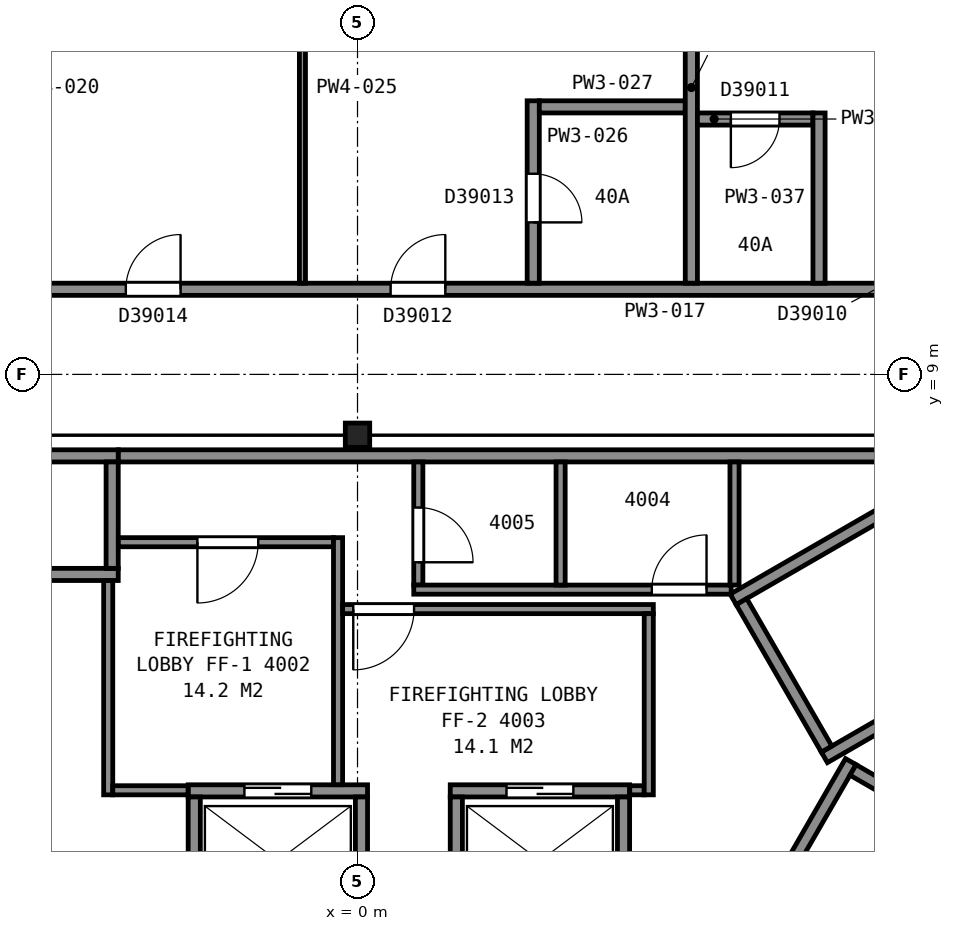
"""IFC4 building model, lengths in metres.
Left out: names, types, materials, properties, quantities, classifications, styles, units other than length and angle.
Written with IfcOpenShell. Run it as: python <this file> out.ifc"""

import sys

from ifc_helpers import new_model, si_unit, direction, frame, frame_2d, origin, origin_2d, place, context, subcontext, project, spatial, rectangle, i_section, extrude, element, fill, save


model = new_model("IFC4")
c1 = context("Model", 3, precision=1e-05, world=origin(), true_north=direction((0.0, 1.0)))
c2 = subcontext(c1, "Body", "Model", "MODEL_VIEW")
j1 = project(units=[si_unit("LENGTHUNIT", "METRE"), si_unit("PLANEANGLEUNIT", "RADIAN")], contexts=[c1])
p1 = place(None, origin())
s1 = spatial("IfcSite", under=j1, at=p1, CompositionType="ELEMENT")
p2 = place(p1, origin())
s2 = spatial("IfcBuilding", under=s1, at=p2, CompositionType="ELEMENT")
p3 = place(p2, frame((0.0, 0.0, 163.6)))
s3 = spatial("IfcBuildingStorey", under=s2, at=p3, CompositionType="ELEMENT", Elevation=163.6)
p4 = place(p3, frame((0.0, 8.0, 0.0), z_axis=(0.0, 0.0, 1.0), x_axis=(1.0, 0.0, 0.0)))
e1 = element("IfcColumn", 1, at=p4, inside=s3, PredefinedType="COLUMN", context=c2, shape_type="SweptSolid", body=[
    extrude(i_section(OverallWidth=0.401, OverallDepth=0.399, WebThickness=0.025, FlangeThickness=0.04, FilletRadius=0.015, at=origin_2d()), origin(), (0.0, 0.0, 1.0), 3.7),
])
for number, where, z_axis, x_axis in (
    (2, (6.178, 5.299, 0.0), (0.0, 0.0, 1.0), (0.866, 0.5, 0.0)),
    (3, (7.678, 2.701, 0.0), (0.0, 0.0, 1.0), (0.866, 0.5, 0.0)),
):
    element("IfcWall", number, at=place(p3, frame(where, z_axis=z_axis, x_axis=x_axis)), inside=s3, PredefinedType="PARTITIONING", context=c2, shape_type="SweptSolid", body=[
        extrude(rectangle(XDim=9.6, YDim=0.2, at=frame_2d((4.8, 0.0))), origin(), (0.0, 0.0, 1.0), 3.45),
    ])
p5 = place(p3, frame((7.715, 2.838, 0.0), z_axis=(0.0, 0.0, 1.0), x_axis=(-0.500049511043, 0.865996816683, 0.0)))
e4 = element("IfcWall", 4, at=p5, inside=s3, PredefinedType="PARTITIONING", context=c2, shape_type="SweptSolid", body=[
    extrude(rectangle(XDim=2.8, YDim=0.2, at=frame_2d((1.4, 0.0))), origin(), (0.0, 0.0, 1.0), 3.45),
])
p6 = place(p3, frame((-2.785, 2.15, 0.0), z_axis=(0.0, 0.0, 1.0), x_axis=(1.0, 0.0, 0.0)))
e5 = element("IfcWall", 5, at=p6, inside=s3, PredefinedType="PARTITIONING", context=c2, shape_type="SweptSolid", body=[
    extrude(rectangle(XDim=2.95, YDim=0.2, at=frame_2d((1.475, 0.0))), origin(), (0.0, 0.0, 1.0), 3.7),
])
p7 = place(p6, frame((0.925, 0.0, 0.0)))
e6 = element("IfcOpeningElement", 6, at=p7, cuts=e5, PredefinedType="OPENING", context=c2, shape_type="SweptSolid", body=[
    extrude(rectangle(XDim=1.1, YDim=2.1, at=frame_2d((0.55, 1.05))), frame((0.0, 0.11, 0.0), z_axis=(0.0, -1.0, 0.0), x_axis=(1.0, 0.0, 0.0)), (0.0, 0.0, 1.0), 0.22),
])
p8 = place(p3, frame((1.525, 2.15, 0.0), z_axis=(0.0, 0.0, 1.0), x_axis=(1.0, 0.0, 0.0)))
e7 = element("IfcWall", 7, at=p8, inside=s3, PredefinedType="PARTITIONING", context=c2, shape_type="SweptSolid", body=[
    extrude(rectangle(XDim=2.95, YDim=0.2, at=frame_2d((1.475, 0.0))), origin(), (0.0, 0.0, 1.0), 3.7),
])
p9 = place(p8, frame((0.925, 0.0, 0.0)))
e8 = element("IfcOpeningElement", 8, at=p9, cuts=e7, PredefinedType="OPENING", context=c2, shape_type="SweptSolid", body=[
    extrude(rectangle(XDim=1.1, YDim=2.1, at=frame_2d((0.55, 1.05))), frame((0.0, 0.11, 0.0), z_axis=(0.0, -1.0, 0.0), x_axis=(1.0, 0.0, 0.0)), (0.0, 0.0, 1.0), 0.22),
])
for number, where, z_axis, x_axis in (
    (9, (-6.285, 5.71, 0.0), (0.0, 0.0, 1.0), (1.0, 0.0, 0.0)),
    (10, (-6.285, 7.66, 0.0), (0.0, 0.0, 1.0), (1.0, 0.0, 0.0)),
):
    element("IfcWall", number, at=place(p3, frame(where, z_axis=z_axis, x_axis=x_axis)), inside=s3, PredefinedType="PARTITIONING", context=c2, shape_type="SweptSolid", body=[
        extrude(rectangle(XDim=2.35, YDim=0.2, at=frame_2d((1.175, 0.0))), origin(), (0.0, 0.0, 1.0), 3.7),
    ])
p10 = place(p3, frame((7.351, -2.587, 0.0), z_axis=(0.0, 0.0, 1.0), x_axis=(0.500002801628, 0.866023786258, 0.0)))
e11 = element("IfcWall", 11, at=p10, inside=s3, PredefinedType="PARTITIONING", context=c2, shape_type="SweptSolid", body=[
    extrude(rectangle(XDim=4.9, YDim=0.2, at=frame_2d((2.45, 0.0))), origin(), (0.0, 0.0, 1.0), 3.7),
])
p11 = place(p3, frame((5.663, -1.612, 0.0), z_axis=(0.0, 0.0, 1.0), x_axis=(0.49998122708, 0.866036242063, 0.0)))
e12 = element("IfcWall", 12, at=p11, inside=s3, PredefinedType="PARTITIONING", context=c2, shape_type="SweptSolid", body=[
    extrude(rectangle(XDim=4.9, YDim=0.2, at=frame_2d((2.45, 0.0))), origin(), (0.0, 0.0, 1.0), 3.7),
])
for number, where, z_axis, x_axis in (
    (13, (4.375, 0.1, 0.0), (0.0, 0.0, 1.0), (0.0, 1.0, 0.0)),
    (14, (1.625, 0.1, 0.0), (0.0, 0.0, 1.0), (0.0, 1.0, 0.0)),
    (15, (0.065, 0.1, 0.0), (0.0, 0.0, 1.0), (0.0, 1.0, 0.0)),
    (16, (-2.685, 0.1, 0.0), (0.0, 0.0, 1.0), (0.0, 1.0, 0.0)),
):
    element("IfcWall", number, at=place(p3, frame(where, z_axis=z_axis, x_axis=x_axis)), inside=s3, PredefinedType="PARTITIONING", context=c2, shape_type="SweptSolid", body=[
        extrude(rectangle(XDim=1.95, YDim=0.2, at=frame_2d((0.975, 0.0))), origin(), (0.0, 0.0, 1.0), 3.7),
    ])
p12 = place(p3, frame((-4.035, 5.81, 0.0), z_axis=(0.0, 0.0, 1.0), x_axis=(0.0, 1.0, 0.0)))
e17 = element("IfcWall", 17, at=p12, inside=s3, PredefinedType="PARTITIONING", context=c2, shape_type="SweptSolid", body=[
    extrude(rectangle(XDim=1.75, YDim=0.2, at=frame_2d((0.875, 0.0))), origin(), (0.0, 0.0, 1.0), 3.7),
])
p13 = place(p3, frame((9.665, 1.62, 0.0), z_axis=(0.0, 0.0, 1.0), x_axis=(-0.866002029911, 0.500040482552, 0.0)))
e18 = element("IfcWall", 18, at=p13, inside=s3, PredefinedType="PARTITIONING", context=c2, shape_type="SweptSolid", body=[
    extrude(rectangle(XDim=1.75, YDim=0.2, at=frame_2d((0.875, 0.0))), origin(), (0.0, 0.0, 1.0), 3.7),
])
p14 = place(p3, frame((-4.1, 2.085, 0.0), z_axis=(0.0, 0.0, 1.0), x_axis=(0.0, 1.0, 0.0)))
e19 = element("IfcWall", 19, at=p14, inside=s3, PredefinedType="PARTITIONING", context=c2, shape_type="SweptSolid", body=[
    extrude(rectangle(XDim=3.523, YDim=0.15, at=frame_2d((1.761, 0.0))), origin(), (0.0, 0.0, 1.0), 3.45),
])
p15 = place(p3, frame((-4.025, 2.16, 0.0), z_axis=(0.0, 0.0, 1.0), x_axis=(1.0, 0.0, 0.0)))
e20 = element("IfcWall", 20, at=p15, inside=s3, PredefinedType="PARTITIONING", context=c2, shape_type="SweptSolid", body=[
    extrude(rectangle(XDim=1.238, YDim=0.15, at=frame_2d((0.619, 0.0))), origin(), (0.0, 0.0, 1.0), 3.45),
])
p16 = place(p3, frame((-3.933, 6.24, 0.0), z_axis=(0.0, 0.0, 1.0), x_axis=(1.0, 0.0, 0.0)))
e21 = element("IfcWall", 21, at=p16, inside=s3, PredefinedType="PARTITIONING", context=c2, shape_type="SweptSolid", body=[
    extrude(rectangle(XDim=3.538, YDim=0.15, at=frame_2d((1.769, 0.0))), origin(), (0.0, 0.0, 1.0), 3.45),
])
p17 = place(p16, frame((1.3, 0.0, 0.0)))
e22 = element("IfcOpeningElement", 22, at=p17, cuts=e21, PredefinedType="OPENING", context=c2, shape_type="SweptSolid", body=[
    extrude(rectangle(XDim=1.0, YDim=2.1, at=frame_2d((0.5, 1.05))), frame((0.0, 0.085, 0.0), z_axis=(0.0, -1.0, 0.0), x_axis=(1.0, 0.0, 0.0)), (0.0, 0.0, 1.0), 0.17),
])
p18 = place(p3, frame((-3.933, 7.66, 0.0), z_axis=(0.0, 0.0, 1.0), x_axis=(1.0, 0.0, 0.0)))
e23 = element("IfcWall", 23, at=p18, inside=s3, PredefinedType="PARTITIONING", context=c2, shape_type="SweptSolid", body=[
    extrude(rectangle(XDim=13.841, YDim=0.2, at=frame_2d((6.92, 0.0))), origin(), (0.0, 0.0, 1.0), 3.45),
])
p19 = place(p3, frame((-0.32, 2.252, 0.0), z_axis=(0.0, 0.0, 1.0), x_axis=(0.0, 1.0, 0.0)))
e24 = element("IfcWall", 24, at=p19, inside=s3, PredefinedType="PARTITIONING", context=c2, shape_type="SweptSolid", body=[
    extrude(rectangle(XDim=4.063, YDim=0.15, at=frame_2d((2.031, 0.0))), origin(), (0.0, 0.0, 1.0), 3.45),
])
p20 = place(p3, frame((-0.245, 5.14, 0.0), z_axis=(0.0, 0.0, 1.0), x_axis=(1.0, 0.0, 0.0)))
e25 = element("IfcWall", 25, at=p20, inside=s3, PredefinedType="PARTITIONING", context=c2, shape_type="SweptSolid", body=[
    extrude(rectangle(XDim=5.11, YDim=0.15, at=frame_2d((2.555, 0.0))), origin(), (0.0, 0.0, 1.0), 3.45),
])
p21 = place(p20, frame((0.175, 0.0, 0.0)))
e26 = element("IfcOpeningElement", 26, at=p21, cuts=e25, PredefinedType="OPENING", context=c2, shape_type="SweptSolid", body=[
    extrude(rectangle(XDim=1.0, YDim=2.1, at=frame_2d((0.5, 1.05))), frame((0.0, 0.085, 0.0), z_axis=(0.0, -1.0, 0.0), x_axis=(1.0, 0.0, 0.0)), (0.0, 0.0, 1.0), 0.17),
])
p22 = place(p3, frame((1.0, 7.56, 0.0), z_axis=(0.0, 0.0, 1.0), x_axis=(0.0, -1.0, 0.0)))
e27 = element("IfcWall", 27, at=p22, inside=s3, PredefinedType="PARTITIONING", context=c2, shape_type="SweptSolid", body=[
    extrude(rectangle(XDim=2.025, YDim=0.15, at=frame_2d((1.013, 0.0))), origin(), (0.0, 0.0, 1.0), 3.45),
])
p23 = place(p22, frame((0.75, 0.0, 0.0)))
e28 = element("IfcOpeningElement", 28, at=p23, cuts=e27, PredefinedType="OPENING", context=c2, shape_type="SweptSolid", body=[
    extrude(rectangle(XDim=0.9, YDim=2.1, at=frame_2d((0.45, 1.05))), frame((0.0, 0.085, 0.0), z_axis=(0.0, -1.0, 0.0), x_axis=(1.0, 0.0, 0.0)), (0.0, 0.0, 1.0), 0.17),
])
p24 = place(p3, frame((0.925, 5.46, 0.0), z_axis=(0.0, 0.0, 1.0), x_axis=(1.0, 0.0, 0.0)))
e29 = element("IfcWall", 29, at=p24, inside=s3, PredefinedType="PARTITIONING", context=c2, shape_type="SweptSolid", body=[
    extrude(rectangle(XDim=5.22, YDim=0.15, at=frame_2d((2.61, 0.0))), origin(), (0.0, 0.0, 1.0), 3.45),
])
p25 = place(p24, frame((3.915, 0.0, 0.0)))
e30 = element("IfcOpeningElement", 30, at=p25, cuts=e29, PredefinedType="OPENING", context=c2, shape_type="SweptSolid", body=[
    extrude(rectangle(XDim=0.9, YDim=2.1, at=frame_2d((0.45, 1.05))), frame((0.0, 0.085, 0.0), z_axis=(0.0, -1.0, 0.0), x_axis=(1.0, 0.0, 0.0)), (0.0, 0.0, 1.0), 0.17),
])
p26 = place(p3, frame((3.34, 5.535, 0.0), z_axis=(0.0, 0.0, 1.0), x_axis=(0.0, 1.0, 0.0)))
e31 = element("IfcWall", 31, at=p26, inside=s3, PredefinedType="PARTITIONING", context=c2, shape_type="SweptSolid", body=[
    extrude(rectangle(XDim=2.025, YDim=0.15, at=frame_2d((1.013, 0.0))), origin(), (0.0, 0.0, 1.0), 3.45),
])
p27 = place(p3, frame((4.477, 2.16, 0.0), z_axis=(0.0, 0.0, 1.0), x_axis=(1.0, 0.0, 0.0)))
e32 = element("IfcWall", 32, at=p27, inside=s3, PredefinedType="PARTITIONING", context=c2, shape_type="SweptSolid", body=[
    extrude(rectangle(XDim=0.238, YDim=0.15, at=frame_2d((0.119, 0.0))), origin(), (0.0, 0.0, 1.0), 3.45),
])
p28 = place(p3, frame((4.79, 2.085, 0.0), z_axis=(0.0, 0.0, 1.0), x_axis=(0.0, 1.0, 0.0)))
e33 = element("IfcWall", 33, at=p28, inside=s3, PredefinedType="PARTITIONING", context=c2, shape_type="SweptSolid", body=[
    extrude(rectangle(XDim=2.98, YDim=0.15, at=frame_2d((1.49, 0.0))), origin(), (0.0, 0.0, 1.0), 3.45),
])
p29 = place(p3, frame((6.2, 5.535, 0.0), z_axis=(0.0, 0.0, 1.0), x_axis=(0.0, 1.0, 0.0)))
e34 = element("IfcWall", 34, at=p29, inside=s3, PredefinedType="PARTITIONING", context=c2, shape_type="SweptSolid", body=[
    extrude(rectangle(XDim=2.025, YDim=0.15, at=frame_2d((1.013, 0.0))), origin(), (0.0, 0.0, 1.0), 3.45),
])
p30 = place(p3, frame((-4.675, -12.706, 0.0), z_axis=(0.0, 0.0, 1.0), x_axis=(-0.499972470324, 0.866041297467, 0.0)))
e35 = element("IfcWall", 35, at=p30, inside=s3, PredefinedType="PARTITIONING", context=c2, shape_type="SweptSolid", body=[
    extrude(rectangle(XDim=17.385, YDim=0.2, at=frame_2d((8.692, 0.0))), origin(), (0.0, 0.0, 1.0), 2.713),
])
p31 = place(p30, frame((15.435, 0.0, 0.0)))
e36 = element("IfcOpeningElement", 36, at=p31, cuts=e35, PredefinedType="OPENING", context=c2, shape_type="SweptSolid", body=[
    extrude(rectangle(XDim=0.9, YDim=2.1, at=frame_2d((0.45, 1.05))), frame((0.0, 0.11, 0.0), z_axis=(0.0, -1.0, 0.0), x_axis=(1.0, 0.0, 0.0)), (0.0, 0.0, 1.0), 0.22),
])
p32 = place(p30, frame((12.835, 0.0, 0.0)))
e37 = element("IfcOpeningElement", 37, at=p32, cuts=e35, PredefinedType="OPENING", context=c2, shape_type="SweptSolid", body=[
    extrude(rectangle(XDim=0.9, YDim=2.1, at=frame_2d((0.45, 1.05))), frame((0.0, 0.11, 0.0), z_axis=(0.0, -1.0, 0.0), x_axis=(1.0, 0.0, 0.0)), (0.0, 0.0, 1.0), 0.22),
])
p33 = place(p30, frame((6.941, 0.0, 0.0)))
e38 = element("IfcOpeningElement", 38, at=p33, cuts=e35, PredefinedType="OPENING", context=c2, shape_type="SweptSolid", body=[
    extrude(rectangle(XDim=0.9, YDim=2.1, at=frame_2d((0.45, 1.05))), frame((0.0, 0.11, 0.0), z_axis=(0.0, -1.0, 0.0), x_axis=(1.0, 0.0, 0.0)), (0.0, 0.0, 1.0), 0.22),
])
p34 = place(p30, frame((2.028, 0.0, 0.0)))
e39 = element("IfcOpeningElement", 39, at=p34, cuts=e35, PredefinedType="OPENING", context=c2, shape_type="SweptSolid", body=[
    extrude(rectangle(XDim=0.9, YDim=2.1, at=frame_2d((0.45, 1.05))), frame((0.0, 0.11, 0.0), z_axis=(0.0, -1.0, 0.0), x_axis=(1.0, 0.0, 0.0)), (0.0, 0.0, 1.0), 0.22),
])
p35 = place(p3, frame((-8.667, 10.4, 0.0), z_axis=(0.0, 0.0, 1.0), x_axis=(1.0, 0.0, 0.0)))
e40 = element("IfcWall", 40, at=p35, inside=s3, PredefinedType="PARTITIONING", context=c2, shape_type="SweptSolid", body=[
    extrude(rectangle(XDim=17.334, YDim=0.2, at=frame_2d((8.667, 0.0))), origin(), (0.0, 0.0, 1.0), 2.713),
])
p36 = place(p35, frame((9.211, 0.0, 0.0)))
e41 = element("IfcOpeningElement", 41, at=p36, cuts=e40, PredefinedType="OPENING", context=c2, shape_type="SweptSolid", body=[
    extrude(rectangle(XDim=0.9, YDim=2.1, at=frame_2d((0.45, 1.05))), frame((0.0, 0.11, 0.0), z_axis=(0.0, -1.0, 0.0), x_axis=(1.0, 0.0, 0.0)), (0.0, 0.0, 1.0), 0.22),
])
p37 = place(p35, frame((4.857, 0.0, 0.0)))
e42 = element("IfcOpeningElement", 42, at=p37, cuts=e40, PredefinedType="OPENING", context=c2, shape_type="SweptSolid", body=[
    extrude(rectangle(XDim=0.9, YDim=2.1, at=frame_2d((0.45, 1.05))), frame((0.0, 0.11, 0.0), z_axis=(0.0, -1.0, 0.0), x_axis=(1.0, 0.0, 0.0)), (0.0, 0.0, 1.0), 0.22),
])
p38 = place(p35, frame((1.0, 0.0, 0.0)))
e43 = element("IfcOpeningElement", 43, at=p38, cuts=e40, PredefinedType="OPENING", context=c2, shape_type="SweptSolid", body=[
    extrude(rectangle(XDim=0.9, YDim=2.1, at=frame_2d((0.45, 1.05))), frame((0.0, 0.11, 0.0), z_axis=(0.0, -1.0, 0.0), x_axis=(1.0, 0.0, 0.0)), (0.0, 0.0, 1.0), 0.22),
])
p39 = place(p3, frame((-0.906, 10.5, 0.0), z_axis=(0.0, 0.0, 1.0), x_axis=(0.0, 1.0, 0.0)))
e44 = element("IfcWall", 44, at=p39, inside=s3, PredefinedType="PARTITIONING", context=c2, shape_type="SweptSolid", body=[
    extrude(rectangle(XDim=6.435, YDim=0.1, at=frame_2d((3.218, 0.0))), origin(), (0.0, 0.0, 1.0), 2.713),
])
p40 = place(p3, frame((2.89, 13.5, 0.0), z_axis=(0.0, 0.0, 1.0), x_axis=(0.0, -1.0, 0.0)))
e45 = element("IfcWall", 45, at=p40, inside=s3, PredefinedType="PARTITIONING", context=c2, shape_type="SweptSolid", body=[
    extrude(rectangle(XDim=3.0, YDim=0.2, at=frame_2d((1.5, 0.0))), origin(), (0.0, 0.0, 1.0), 2.713),
])
p41 = place(p40, frame((1.2, 0.0, 0.0)))
e46 = element("IfcOpeningElement", 46, at=p41, cuts=e45, PredefinedType="OPENING", context=c2, shape_type="SweptSolid", body=[
    extrude(rectangle(XDim=0.8, YDim=2.1, at=frame_2d((0.4, 1.05))), frame((0.0, 0.11, 0.0), z_axis=(0.0, -1.0, 0.0), x_axis=(1.0, 0.0, 0.0)), (0.0, 0.0, 1.0), 0.22),
])
p42 = place(p3, frame((2.99, 13.4, 0.0), z_axis=(0.0, 0.0, 1.0), x_axis=(1.0, 0.0, 0.0)))
e47 = element("IfcWall", 47, at=p42, inside=s3, PredefinedType="PARTITIONING", context=c2, shape_type="SweptSolid", body=[
    extrude(rectangle(XDim=2.4, YDim=0.2, at=frame_2d((1.2, 0.0))), origin(), (0.0, 0.0, 1.0), 2.713),
])
p43 = place(p3, frame((13.342, 2.306, 0.0), z_axis=(0.0, 0.0, 1.0), x_axis=(-0.49997635812, -0.866039053, 0.0)))
e48 = element("IfcWall", 48, at=p43, inside=s3, PredefinedType="PARTITIONING", context=c2, shape_type="SweptSolid", body=[
    extrude(rectangle(XDim=17.285, YDim=0.1, at=frame_2d((8.643, 0.0))), origin(), (0.0, 0.0, 1.0), 2.713),
])
p44 = place(p43, frame((15.585, 0.0, 0.0)))
e49 = element("IfcOpeningElement", 49, at=p44, cuts=e48, PredefinedType="OPENING", context=c2, shape_type="SweptSolid", body=[
    extrude(rectangle(XDim=0.9, YDim=2.1, at=frame_2d((0.45, 1.05))), frame((0.0, 0.06, 0.0), z_axis=(0.0, -1.0, 0.0), x_axis=(1.0, 0.0, 0.0)), (0.0, 0.0, 1.0), 0.12),
])
p45 = place(p43, frame((11.595, 0.0, 0.0)))
e50 = element("IfcOpeningElement", 50, at=p45, cuts=e48, PredefinedType="OPENING", context=c2, shape_type="SweptSolid", body=[
    extrude(rectangle(XDim=0.9, YDim=2.1, at=frame_2d((0.45, 1.05))), frame((0.0, 0.06, 0.0), z_axis=(0.0, -1.0, 0.0), x_axis=(1.0, 0.0, 0.0)), (0.0, 0.0, 1.0), 0.12),
])
p46 = place(p43, frame((6.171, 0.0, 0.0)))
e51 = element("IfcOpeningElement", 51, at=p46, cuts=e48, PredefinedType="OPENING", context=c2, shape_type="SweptSolid", body=[
    extrude(rectangle(XDim=0.9, YDim=2.1, at=frame_2d((0.45, 1.05))), frame((0.0, 0.06, 0.0), z_axis=(0.0, -1.0, 0.0), x_axis=(1.0, 0.0, 0.0)), (0.0, 0.0, 1.0), 0.12),
])
p47 = place(p3, frame((5.49, 10.5, 0.0), z_axis=(0.0, 0.0, 1.0), x_axis=(0.0, 1.0, 0.0)))
e52 = element("IfcWall", 52, at=p47, inside=s3, PredefinedType="PARTITIONING", context=c2, shape_type="SweptSolid", body=[
    extrude(rectangle(XDim=6.435, YDim=0.2, at=frame_2d((3.218, 0.0))), origin(), (0.0, 0.0, 1.0), 2.713),
])
p48 = place(p3, frame((7.49, 13.2, 0.0), z_axis=(0.0, 0.0, 1.0), x_axis=(-1.0, 0.0, 0.0)))
e53 = element("IfcWall", 53, at=p48, inside=s3, PredefinedType="PARTITIONING", context=c2, shape_type="SweptSolid", body=[
    extrude(rectangle(XDim=1.9, YDim=0.2, at=frame_2d((0.95, 0.0))), origin(), (0.0, 0.0, 1.0), 2.713),
])
p49 = place(p48, frame((0.55, 0.0, 0.0)))
e54 = element("IfcOpeningElement", 54, at=p49, cuts=e53, PredefinedType="OPENING", context=c2, shape_type="SweptSolid", body=[
    extrude(rectangle(XDim=0.8, YDim=2.1, at=frame_2d((0.4, 1.05))), frame((0.0, 0.11, 0.0), z_axis=(0.0, -1.0, 0.0), x_axis=(1.0, 0.0, 0.0)), (0.0, 0.0, 1.0), 0.22),
])
p50 = place(p3, frame((7.59, 10.5, 0.0), z_axis=(0.0, 0.0, 1.0), x_axis=(0.0, 1.0, 0.0)))
e55 = element("IfcWall", 55, at=p50, inside=s3, PredefinedType="PARTITIONING", context=c2, shape_type="SweptSolid", body=[
    extrude(rectangle(XDim=2.8, YDim=0.2, at=frame_2d((1.4, 0.0))), origin(), (0.0, 0.0, 1.0), 2.713),
])
p51 = place(p7, origin())
e56 = element("IfcDoor", 56, at=p51, inside=s3, OperationType="SLIDING_TO_LEFT", PredefinedType="DOOR", context=c2, shape_type="SweptSolid", body=[
    extrude(rectangle(XDim=1.1, YDim=2.1, at=frame_2d((0.55, 1.05))), frame((0.0, 0.025, 0.0), z_axis=(0.0, -1.0, 0.0), x_axis=(1.0, 0.0, 0.0)), (0.0, 0.0, 1.0), 0.05),
])
fill(e6, e56)
p52 = place(p9, origin())
e57 = element("IfcDoor", 57, at=p52, inside=s3, OperationType="SLIDING_TO_RIGHT", PredefinedType="DOOR", context=c2, shape_type="SweptSolid", body=[
    extrude(rectangle(XDim=1.1, YDim=2.1, at=frame_2d((0.55, 1.05))), frame((0.0, 0.025, 0.0), z_axis=(0.0, -1.0, 0.0), x_axis=(1.0, 0.0, 0.0)), (0.0, 0.0, 1.0), 0.05),
])
fill(e8, e57)
p53 = place(p17, origin())
e58 = element("IfcDoor", 58, at=p53, inside=s3, OperationType="SINGLE_SWING_LEFT", PredefinedType="DOOR", context=c2, shape_type="SweptSolid", body=[
    extrude(rectangle(XDim=1.0, YDim=2.1, at=frame_2d((0.5, 1.05))), frame((0.0, 0.025, 0.0), z_axis=(0.0, -1.0, 0.0), x_axis=(1.0, 0.0, 0.0)), (0.0, 0.0, 1.0), 0.05),
])
fill(e22, e58)
p54 = place(p21, origin())
e59 = element("IfcDoor", 59, at=p54, inside=s3, OperationType="SINGLE_SWING_LEFT", PredefinedType="DOOR", context=c2, shape_type="SweptSolid", body=[
    extrude(rectangle(XDim=1.0, YDim=2.1, at=frame_2d((0.5, 1.05))), frame((0.0, 0.025, 0.0), z_axis=(0.0, -1.0, 0.0), x_axis=(1.0, 0.0, 0.0)), (0.0, 0.0, 1.0), 0.05),
])
fill(e26, e59)
p55 = place(p23, origin())
e60 = element("IfcDoor", 60, at=p55, inside=s3, OperationType="SINGLE_SWING_RIGHT", PredefinedType="DOOR", context=c2, shape_type="SweptSolid", body=[
    extrude(rectangle(XDim=0.9, YDim=2.1, at=frame_2d((0.45, 1.05))), frame((0.0, 0.025, 0.0), z_axis=(0.0, -1.0, 0.0), x_axis=(1.0, 0.0, 0.0)), (0.0, 0.0, 1.0), 0.05),
])
fill(e28, e60)
p56 = place(p25, origin())
e61 = element("IfcDoor", 61, at=p56, inside=s3, OperationType="SINGLE_SWING_RIGHT", PredefinedType="DOOR", context=c2, shape_type="SweptSolid", body=[
    extrude(rectangle(XDim=0.9, YDim=2.1, at=frame_2d((0.45, 1.05))), frame((0.0, 0.025, 0.0), z_axis=(0.0, -1.0, 0.0), x_axis=(1.0, 0.0, 0.0)), (0.0, 0.0, 1.0), 0.05),
])
fill(e30, e61)
p57 = place(p36, origin())
e62 = element("IfcDoor", 62, at=p57, inside=s3, OperationType="SINGLE_SWING_RIGHT", PredefinedType="DOOR", context=c2, shape_type="SweptSolid", body=[
    extrude(rectangle(XDim=0.9, YDim=2.1, at=frame_2d((0.45, 1.05))), frame((0.0, 0.025, 0.0), z_axis=(0.0, -1.0, 0.0), x_axis=(1.0, 0.0, 0.0)), (0.0, 0.0, 1.0), 0.05),
])
fill(e41, e62)
p58 = place(p37, origin())
e63 = element("IfcDoor", 63, at=p58, inside=s3, OperationType="SINGLE_SWING_RIGHT", PredefinedType="DOOR", context=c2, shape_type="SweptSolid", body=[
    extrude(rectangle(XDim=0.9, YDim=2.1, at=frame_2d((0.45, 1.05))), frame((0.0, 0.025, 0.0), z_axis=(0.0, -1.0, 0.0), x_axis=(1.0, 0.0, 0.0)), (0.0, 0.0, 1.0), 0.05),
])
fill(e42, e63)
p59 = place(p41, origin())
e64 = element("IfcDoor", 64, at=p59, inside=s3, OperationType="SINGLE_SWING_RIGHT", PredefinedType="DOOR", context=c2, shape_type="SweptSolid", body=[
    extrude(rectangle(XDim=0.8, YDim=2.1, at=frame_2d((0.4, 1.05))), frame((0.0, 0.025, 0.0), z_axis=(0.0, -1.0, 0.0), x_axis=(1.0, 0.0, 0.0)), (0.0, 0.0, 1.0), 0.05),
])
fill(e46, e64)
p60 = place(p49, origin())
e65 = element("IfcDoor", 65, at=p60, inside=s3, OperationType="SINGLE_SWING_RIGHT", PredefinedType="DOOR", context=c2, shape_type="SweptSolid", body=[
    extrude(rectangle(XDim=0.8, YDim=2.1, at=frame_2d((0.4, 1.05))), frame((0.0, 0.025, 0.0), z_axis=(0.0, -1.0, 0.0), x_axis=(1.0, 0.0, 0.0)), (0.0, 0.0, 1.0), 0.05),
])
fill(e54, e65)
save(model, sys.argv[1])
